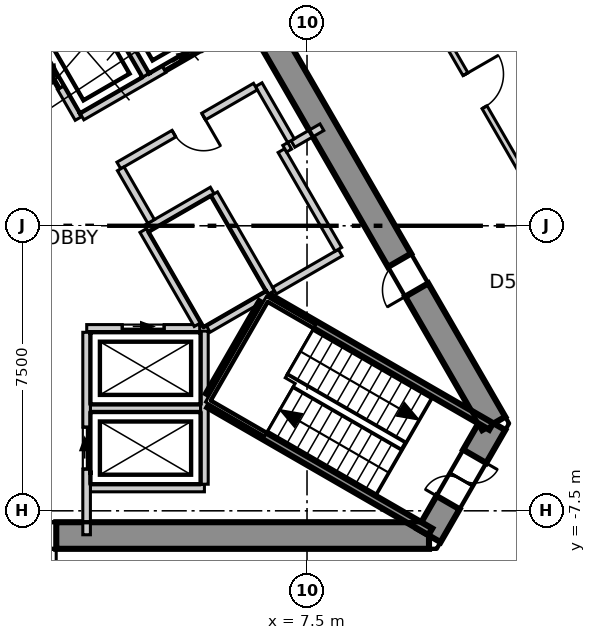
"""IFC4 building model, lengths in metres.
Left out: names, types, materials, properties, quantities, classifications, styles, units other than length and angle.
Written with IfcOpenShell. Run it as: python <this file> out.ifc"""

import sys

from ifc_helpers import new_model, si_unit, direction, frame, frame_2d, origin, place, context, subcontext, project, spatial, polyline, rectangle, outline, extrude, element, fill, save


model = new_model("IFC4")
c1 = context("Model", 3, precision=1e-05, world=origin(), true_north=direction((0.0, 1.0)))
c2 = subcontext(c1, "Body", "Model", "MODEL_VIEW")
j1 = project(units=[si_unit("LENGTHUNIT", "METRE"), si_unit("PLANEANGLEUNIT", "RADIAN")], contexts=[c1])
p1 = place(None, origin())
s1 = spatial("IfcSite", under=j1, at=p1, CompositionType="ELEMENT")
p2 = place(p1, origin())
s2 = spatial("IfcBuilding", under=s1, at=p2, CompositionType="ELEMENT")
p3 = place(p2, frame((0.0, 0.0, 239.3)))
s3 = spatial("IfcBuildingStorey", under=s2, at=p3, CompositionType="ELEMENT", Elevation=239.3)
p4 = place(p3, frame((-10.71, -8.15, -0.3), z_axis=(0.0, 0.0, 1.0), x_axis=(1.0, 0.0, 0.0)))
e1 = element("IfcWall", 1, at=p4, inside=s3, PredefinedType="SHEAR", context=c2, shape_type="SweptSolid", body=[
    extrude(outline(polyline([(-0.202, -0.35), (1.782, -0.35), (3.766, -0.35), (5.75, -0.35), (7.734, -0.35), (9.718, -0.35), (11.702, -0.35), (13.686, -0.35), (15.67, -0.35), (17.654, -0.35), (19.638, -0.35), (21.622, -0.35), (21.218, 0.35), (19.307, 0.35), (17.397, 0.35), (15.486, 0.35), (13.576, 0.35), (11.665, 0.35), (9.755, 0.35), (7.844, 0.35), (5.934, 0.35), (4.023, 0.35), (2.113, 0.35), (0.202, 0.35), (-0.202, -0.35)])), origin(), (0.0, 0.0, 1.0), 4.0),
])
p5 = place(p4, frame((9.81, 0.0, 0.3)))
e2 = element("IfcOpeningElement", 2, at=p5, cuts=e1, PredefinedType="OPENING", context=c2, shape_type="SweptSolid", body=[
    extrude(rectangle(XDim=1.8, YDim=2.1, at=frame_2d((0.9, 1.05))), frame((0.0, 0.36, 0.0), z_axis=(0.0, -1.0, 0.0), x_axis=(1.0, 0.0, 0.0)), (0.0, 0.0, 1.0), 0.72),
])
p6 = place(p3, frame((10.71, -8.15, -0.3), z_axis=(0.0, 0.0, 1.0), x_axis=(0.49999337185, 0.866029230515, 0.0)))
e3 = element("IfcWall", 3, at=p6, inside=s3, PredefinedType="SHEAR", context=c2, shape_type="SweptSolid", body=[
    extrude(outline(polyline([(-0.202, -0.35), (1.703, -0.35), (3.608, -0.35), (3.204, 0.35), (1.703, 0.35), (0.202, 0.35), (-0.202, -0.35)])), origin(), (0.0, 0.0, 1.0), 4.0),
])
p7 = place(p6, frame((1.003, 0.0, 0.3)))
e4 = element("IfcOpeningElement", 4, at=p7, cuts=e3, PredefinedType="OPENING", context=c2, shape_type="SweptSolid", body=[
    extrude(rectangle(XDim=1.4, YDim=2.1, at=frame_2d((0.7, 1.05))), frame((0.0, 0.36, 0.0), z_axis=(0.0, -1.0, 0.0), x_axis=(1.0, 0.0, 0.0)), (0.0, 0.0, 1.0), 0.72),
])
p8 = place(p3, frame((12.413, -5.2, -0.3), z_axis=(0.0, 0.0, 1.0), x_axis=(-0.500011533395, 0.866018744874, 0.0)))
e5 = element("IfcWall", 5, at=p8, inside=s3, PredefinedType="SHEAR", context=c2, shape_type="SweptSolid", body=[
    extrude(outline(polyline([(-0.202, -0.35), (1.782, -0.35), (3.766, -0.35), (5.75, -0.35), (7.734, -0.35), (9.718, -0.35), (11.702, -0.35), (13.686, -0.35), (15.67, -0.35), (17.654, -0.35), (19.638, -0.35), (21.622, -0.35), (21.218, 0.35), (19.307, 0.35), (17.397, 0.35), (15.486, 0.35), (13.576, 0.35), (11.665, 0.35), (9.755, 0.35), (7.844, 0.35), (5.934, 0.35), (4.023, 0.35), (2.113, 0.35), (0.202, 0.35), (-0.202, -0.35)])), origin(), (0.0, 0.0, 1.0), 4.0),
])
p9 = place(p8, frame((4.055, 0.0, 0.3)))
e6 = element("IfcOpeningElement", 6, at=p9, cuts=e5, PredefinedType="OPENING", context=c2, shape_type="SweptSolid", body=[
    extrude(rectangle(XDim=0.9, YDim=2.1, at=frame_2d((0.45, 1.05))), frame((0.0, 0.36, 0.0), z_axis=(0.0, -1.0, 0.0), x_axis=(1.0, 0.0, 0.0)), (0.0, 0.0, 1.0), 0.72),
])
p10 = place(p8, frame((16.415, 0.0, 0.3)))
e7 = element("IfcOpeningElement", 7, at=p10, cuts=e5, PredefinedType="OPENING", context=c2, shape_type="SweptSolid", body=[
    extrude(rectangle(XDim=1.0, YDim=2.1, at=frame_2d((0.5, 1.05))), frame((0.0, 0.36, 0.0), z_axis=(0.0, -1.0, 0.0), x_axis=(1.0, 0.0, 0.0)), (0.0, 0.0, 1.0), 0.72),
])
p11 = place(p3, frame((27.32, -12.671, 0.0), z_axis=(0.0, 0.0, 1.0), x_axis=(-0.499995097538, 0.866028234204, 0.0)))
e8 = element("IfcWall", 8, at=p11, inside=s3, PredefinedType="ELEMENTEDWALL", context=c2, shape_type="SweptSolid", body=[
    extrude(rectangle(XDim=49.247, YDim=0.2, at=frame_2d((24.623, 0.0))), origin(), (0.0, 0.0, 1.0), 3.7),
])
p12 = place(p11, frame((2.119, 0.0, 0.9)))
e9 = element("IfcOpeningElement", 9, at=p12, cuts=e8, PredefinedType="OPENING", context=c2, shape_type="SweptSolid", body=[
    extrude(rectangle(XDim=4.2, YDim=2.5, at=frame_2d((2.1, 1.25))), frame((0.0, 0.11, 0.0), z_axis=(0.0, -1.0, 0.0), x_axis=(1.0, 0.0, 0.0)), (0.0, 0.0, 1.0), 0.22),
])
p13 = place(p11, frame((7.952, 0.0, 0.9)))
e10 = element("IfcOpeningElement", 10, at=p13, cuts=e8, PredefinedType="OPENING", context=c2, shape_type="SweptSolid", body=[
    extrude(rectangle(XDim=4.2, YDim=2.5, at=frame_2d((2.1, 1.25))), frame((0.0, 0.11, 0.0), z_axis=(0.0, -1.0, 0.0), x_axis=(1.0, 0.0, 0.0)), (0.0, 0.0, 1.0), 0.22),
])
p14 = place(p11, frame((13.784, 0.0, 0.9)))
e11 = element("IfcOpeningElement", 11, at=p14, cuts=e8, PredefinedType="OPENING", context=c2, shape_type="SweptSolid", body=[
    extrude(rectangle(XDim=4.2, YDim=2.5, at=frame_2d((2.1, 1.25))), frame((0.0, 0.11, 0.0), z_axis=(0.0, -1.0, 0.0), x_axis=(1.0, 0.0, 0.0)), (0.0, 0.0, 1.0), 0.22),
])
p15 = place(p11, frame((19.617, 0.0, 0.9)))
e12 = element("IfcOpeningElement", 12, at=p15, cuts=e8, PredefinedType="OPENING", context=c2, shape_type="SweptSolid", body=[
    extrude(rectangle(XDim=4.2, YDim=2.5, at=frame_2d((2.1, 1.25))), frame((0.0, 0.11, 0.0), z_axis=(0.0, -1.0, 0.0), x_axis=(1.0, 0.0, 0.0)), (0.0, 0.0, 1.0), 0.22),
])
p16 = place(p11, frame((25.45, 0.0, 0.9)))
e13 = element("IfcOpeningElement", 13, at=p16, cuts=e8, PredefinedType="OPENING", context=c2, shape_type="SweptSolid", body=[
    extrude(rectangle(XDim=4.2, YDim=2.5, at=frame_2d((2.1, 1.25))), frame((0.0, 0.11, 0.0), z_axis=(0.0, -1.0, 0.0), x_axis=(1.0, 0.0, 0.0)), (0.0, 0.0, 1.0), 0.22),
])
p17 = place(p11, frame((31.282, 0.0, 0.9)))
e14 = element("IfcOpeningElement", 14, at=p17, cuts=e8, PredefinedType="OPENING", context=c2, shape_type="SweptSolid", body=[
    extrude(rectangle(XDim=4.2, YDim=2.5, at=frame_2d((2.1, 1.25))), frame((0.0, 0.11, 0.0), z_axis=(0.0, -1.0, 0.0), x_axis=(1.0, 0.0, 0.0)), (0.0, 0.0, 1.0), 0.22),
])
p18 = place(p11, frame((37.115, 0.0, 0.9)))
e15 = element("IfcOpeningElement", 15, at=p18, cuts=e8, PredefinedType="OPENING", context=c2, shape_type="SweptSolid", body=[
    extrude(rectangle(XDim=4.2, YDim=2.5, at=frame_2d((2.1, 1.25))), frame((0.0, 0.11, 0.0), z_axis=(0.0, -1.0, 0.0), x_axis=(1.0, 0.0, 0.0)), (0.0, 0.0, 1.0), 0.22),
])
p19 = place(p11, frame((42.947, 0.0, 0.9)))
e16 = element("IfcOpeningElement", 16, at=p19, cuts=e8, PredefinedType="OPENING", context=c2, shape_type="SweptSolid", body=[
    extrude(rectangle(XDim=4.2, YDim=2.5, at=frame_2d((2.1, 1.25))), frame((0.0, 0.11, 0.0), z_axis=(0.0, -1.0, 0.0), x_axis=(1.0, 0.0, 0.0)), (0.0, 0.0, 1.0), 0.22),
])
p20 = place(p3, frame((0.075, 24.07, 0.0), z_axis=(0.0, 0.0, 1.0), x_axis=(0.500006834213, -0.866021458014, 0.0)))
e17 = element("IfcWall", 17, at=p20, inside=s3, PredefinedType="PARTITIONING", context=c2, shape_type="SweptSolid", body=[
    extrude(rectangle(XDim=41.616, YDim=0.15, at=frame_2d((20.808, 0.0))), origin(), (0.0, 0.0, 1.0), 3.7),
])
p21 = place(p20, frame((36.616, 0.0, 0.0)))
e18 = element("IfcOpeningElement", 18, at=p21, cuts=e17, PredefinedType="OPENING", context=c2, shape_type="SweptSolid", body=[
    extrude(rectangle(XDim=1.1, YDim=2.1, at=frame_2d((0.55, 1.05))), frame((0.0, 0.085, 0.0), z_axis=(0.0, -1.0, 0.0), x_axis=(1.0, 0.0, 0.0)), (0.0, 0.0, 1.0), 0.17),
])
p22 = place(p20, frame((29.024, 0.0, 0.0)))
e19 = element("IfcOpeningElement", 19, at=p22, cuts=e17, PredefinedType="OPENING", context=c2, shape_type="SweptSolid", body=[
    extrude(rectangle(XDim=1.0, YDim=2.1, at=frame_2d((0.5, 1.05))), frame((0.0, 0.085, 0.0), z_axis=(0.0, -1.0, 0.0), x_axis=(1.0, 0.0, 0.0)), (0.0, 0.0, 1.0), 0.17),
])
p23 = place(p20, frame((23.19, 0.0, 0.0)))
e20 = element("IfcOpeningElement", 20, at=p23, cuts=e17, PredefinedType="OPENING", context=c2, shape_type="SweptSolid", body=[
    extrude(rectangle(XDim=1.0, YDim=2.1, at=frame_2d((0.5, 1.05))), frame((0.0, 0.085, 0.0), z_axis=(0.0, -1.0, 0.0), x_axis=(1.0, 0.0, 0.0)), (0.0, 0.0, 1.0), 0.17),
])
p24 = place(p20, frame((14.458, 0.0, 0.0)))
e21 = element("IfcOpeningElement", 21, at=p24, cuts=e17, PredefinedType="OPENING", context=c2, shape_type="SweptSolid", body=[
    extrude(rectangle(XDim=1.1, YDim=2.1, at=frame_2d((0.55, 1.05))), frame((0.0, 0.085, 0.0), z_axis=(0.0, -1.0, 0.0), x_axis=(1.0, 0.0, 0.0)), (0.0, 0.0, 1.0), 0.17),
])
p25 = place(p20, frame((3.993, 0.0, 0.0)))
e22 = element("IfcOpeningElement", 22, at=p25, cuts=e17, PredefinedType="OPENING", context=c2, shape_type="SweptSolid", body=[
    extrude(rectangle(XDim=1.1, YDim=2.1, at=frame_2d((0.55, 1.05))), frame((0.0, 0.085, 0.0), z_axis=(0.0, -1.0, 0.0), x_axis=(1.0, 0.0, 0.0)), (0.0, 0.0, 1.0), 0.17),
])
p26 = place(p3, frame((1.8, -4.8, 0.0), z_axis=(0.0, 0.0, 1.0), x_axis=(1.0, 0.0, 0.0)))
e23 = element("IfcWall", 23, at=p26, inside=s3, PredefinedType="SOLIDWALL", context=c2, shape_type="SweptSolid", body=[
    extrude(rectangle(XDim=2.9, YDim=0.2, at=frame_2d((1.45, 0.0))), origin(), (0.0, 0.0, 1.0), 3.7),
])
p27 = place(p3, frame((1.8, -6.9, 0.0), z_axis=(0.0, 0.0, 1.0), x_axis=(1.0, 0.0, 0.0)))
e24 = element("IfcWall", 24, at=p27, inside=s3, PredefinedType="SOLIDWALL", context=c2, shape_type="SweptSolid", body=[
    extrude(rectangle(XDim=3.0, YDim=0.2, at=frame_2d((1.5, 0.0))), origin(), (0.0, 0.0, 1.0), 3.7),
])
p28 = place(p3, frame((1.703, -2.7, 0.0), z_axis=(0.0, 0.0, 1.0), x_axis=(1.0, 0.0, 0.0)))
e25 = element("IfcWall", 25, at=p28, inside=s3, PredefinedType="SOLIDWALL", context=c2, shape_type="SweptSolid", body=[
    extrude(rectangle(XDim=2.973, YDim=0.2, at=frame_2d((1.487, 0.0))), origin(), (0.0, 0.0, 1.0), 3.7),
])
p29 = place(p28, frame((0.936, 0.0, 0.0)))
e26 = element("IfcOpeningElement", 26, at=p29, cuts=e25, PredefinedType="OPENING", context=c2, shape_type="SweptSolid", body=[
    extrude(rectangle(XDim=1.1, YDim=2.1, at=frame_2d((0.55, 1.05))), frame((0.0, 0.11, 0.0), z_axis=(0.0, -1.0, 0.0), x_axis=(1.0, 0.0, 0.0)), (0.0, 0.0, 1.0), 0.22),
])
p30 = place(p3, frame((0.0, 5.4, 0.0), z_axis=(0.0, 0.0, 1.0), x_axis=(0.500103862429, -0.865965430478, 0.0)))
e27 = element("IfcWall", 27, at=p30, inside=s3, PredefinedType="SOLIDWALL", context=c2, shape_type="SweptSolid", body=[
    extrude(rectangle(XDim=2.973, YDim=0.2, at=frame_2d((1.487, 0.0))), origin(), (0.0, 0.0, 1.0), 3.7),
])
p31 = place(p30, frame((0.937, 0.0, 0.0)))
e28 = element("IfcOpeningElement", 28, at=p31, cuts=e27, PredefinedType="OPENING", context=c2, shape_type="SweptSolid", body=[
    extrude(rectangle(XDim=1.1, YDim=2.1, at=frame_2d((0.55, 1.05))), frame((0.0, 0.11, 0.0), z_axis=(0.0, -1.0, 0.0), x_axis=(1.0, 0.0, 0.0)), (0.0, 0.0, 1.0), 0.22),
])
p32 = place(p3, frame((3.19, -0.125, 0.0), z_axis=(0.0, 0.0, 1.0), x_axis=(0.499988658015, -0.866031951983, 0.0)))
e29 = element("IfcWall", 29, at=p32, inside=s3, PredefinedType="SOLIDWALL", context=c2, shape_type="SweptSolid", body=[
    extrude(rectangle(XDim=2.858, YDim=0.2, at=frame_2d((1.429, 0.0))), origin(), (0.0, 0.0, 1.0), 3.7),
])
p33 = place(p3, frame((1.578, 2.874, 0.0), z_axis=(0.0, 0.0, 1.0), x_axis=(0.866045911672, 0.499964477614, 0.0)))
e30 = element("IfcWall", 30, at=p33, inside=s3, PredefinedType="SOLIDWALL", context=c2, shape_type="SweptSolid", body=[
    extrude(rectangle(XDim=5.327, YDim=0.2, at=frame_2d((2.663, 0.0))), origin(), (0.0, 0.0, 1.0), 3.7),
])
p34 = place(p33, frame((2.496, 0.0, 0.0)))
e31 = element("IfcOpeningElement", 31, at=p34, cuts=e30, PredefinedType="OPENING", context=c2, shape_type="SweptSolid", body=[
    extrude(rectangle(XDim=1.1, YDim=2.1, at=frame_2d((0.55, 1.05))), frame((0.0, 0.11, 0.0), z_axis=(0.0, -1.0, 0.0), x_axis=(1.0, 0.0, 0.0)), (0.0, 0.0, 1.0), 0.22),
])
p35 = place(p3, frame((1.7, -8.13, 0.0), z_axis=(0.0, 0.0, 1.0), x_axis=(0.0, 1.0, 0.0)))
e32 = element("IfcWall", 32, at=p35, inside=s3, PredefinedType="SOLIDWALL", context=c2, shape_type="SweptSolid", body=[
    extrude(rectangle(XDim=5.327, YDim=0.2, at=frame_2d((2.664, 0.0))), origin(), (0.0, 0.0, 1.0), 3.7),
])
p36 = place(p35, frame((1.73, 0.0, 0.0)))
e33 = element("IfcOpeningElement", 33, at=p36, cuts=e32, PredefinedType="OPENING", context=c2, shape_type="SweptSolid", body=[
    extrude(rectangle(XDim=1.1, YDim=2.1, at=frame_2d((0.55, 1.05))), frame((0.0, 0.11, 0.0), z_axis=(0.0, -1.0, 0.0), x_axis=(1.0, 0.0, 0.0)), (0.0, 0.0, 1.0), 0.22),
])
p37 = place(p3, frame((4.8, -6.8, 0.0), z_axis=(0.0, 0.0, 1.0), x_axis=(0.0, 1.0, 0.0)))
e34 = element("IfcWall", 34, at=p37, inside=s3, PredefinedType="SOLIDWALL", context=c2, shape_type="SweptSolid", body=[
    extrude(rectangle(XDim=4.029, YDim=0.2, at=frame_2d((2.015, 0.0))), origin(), (0.0, 0.0, 1.0), 3.7),
])
p38 = place(p3, frame((3.278, -0.071, 0.0), z_axis=(0.0, 0.0, 1.0), x_axis=(0.865855657918, 0.500293893279, 0.0)))
e35 = element("IfcWall", 35, at=p38, inside=s3, PredefinedType="SOLIDWALL", context=c2, shape_type="SweptSolid", body=[
    extrude(rectangle(XDim=1.997, YDim=0.2, at=frame_2d((0.999, 0.0))), origin(), (0.0, 0.0, 1.0), 3.7),
])
p39 = place(p3, frame((7.129, 2.153, 0.0), z_axis=(0.0, 0.0, 1.0), x_axis=(0.866083962871, 0.499898558967, 0.0)))
e36 = element("IfcWall", 36, at=p39, inside=s3, PredefinedType="SOLIDWALL", context=c2, shape_type="SweptSolid", body=[
    extrude(rectangle(XDim=0.88, YDim=0.2, at=frame_2d((0.44, 0.0))), origin(), (0.0, 0.0, 1.0), 3.7),
])
p40 = place(p3, frame((1.807, 6.47, 0.0), z_axis=(0.0, 0.0, 1.0), x_axis=(0.50012328804, -0.865954211699, 0.0)))
e37 = element("IfcWall", 37, at=p40, inside=s3, PredefinedType="SOLIDWALL", context=c2, shape_type="SweptSolid", body=[
    extrude(rectangle(XDim=2.9, YDim=0.2, at=frame_2d((1.45, 0.0))), origin(), (0.0, 0.0, 1.0), 3.7),
])
p41 = place(p3, frame((5.057, 0.841, 0.0), z_axis=(0.0, 0.0, 1.0), x_axis=(0.499990139034, -0.866031096941, 0.0)))
e38 = element("IfcWall", 38, at=p41, inside=s3, PredefinedType="SOLIDWALL", context=c2, shape_type="SweptSolid", body=[
    extrude(rectangle(XDim=3.0, YDim=0.2, at=frame_2d((1.5, 0.0))), origin(), (0.0, 0.0, 1.0), 3.7),
])
p42 = place(p3, frame((4.9, -2.714, 0.0), z_axis=(0.0, 0.0, 1.0), x_axis=(0.865846928409, 0.500309001083, 0.0)))
e39 = element("IfcWall", 39, at=p42, inside=s3, PredefinedType="SOLIDWALL", context=c2, shape_type="SweptSolid", body=[
    extrude(rectangle(XDim=1.813, YDim=0.2, at=frame_2d((0.907, 0.0))), origin(), (0.0, 0.0, 1.0), 3.7),
])
p43 = place(p3, frame((6.229, 3.712, 0.0), z_axis=(0.0, 0.0, 1.0), x_axis=(0.499875724984, -0.86609714211, 0.0)))
e40 = element("IfcWall", 40, at=p43, inside=s3, PredefinedType="SOLIDWALL", context=c2, shape_type="SweptSolid", body=[
    extrude(rectangle(XDim=1.701, YDim=0.2, at=frame_2d((0.85, 0.0))), origin(), (0.0, 0.0, 1.0), 3.7),
])
p44 = place(p3, frame((2.548, 1.587, 0.0), z_axis=(0.0, 0.0, 1.0), x_axis=(0.866004344652, 0.500036473714, 0.0)))
e41 = element("IfcWall", 41, at=p44, inside=s3, PredefinedType="SOLIDWALL", context=c2, shape_type="SweptSolid", body=[
    extrude(rectangle(XDim=4.15, YDim=0.2, at=frame_2d((2.075, 0.0))), origin(), (0.0, 0.0, 1.0), 3.7),
])
p45 = place(p44, frame((1.675, 0.0, 0.0)))
e42 = element("IfcOpeningElement", 42, at=p45, cuts=e41, PredefinedType="OPENING", context=c2, shape_type="SweptSolid", body=[
    extrude(rectangle(XDim=0.9, YDim=2.1, at=frame_2d((0.45, 1.05))), frame((0.0, 0.11, 0.0), z_axis=(0.0, -1.0, 0.0), x_axis=(1.0, 0.0, 0.0)), (0.0, 0.0, 1.0), 0.22),
])
p46 = place(p3, frame((2.598, 1.5, 0.0), z_axis=(0.0, 0.0, 1.0), x_axis=(0.499929347863, -0.866066190972, 0.0)))
e43 = element("IfcWall", 43, at=p46, inside=s3, PredefinedType="SOLIDWALL", context=c2, shape_type="SweptSolid", body=[
    extrude(rectangle(XDim=1.6, YDim=0.2, at=frame_2d((0.8, 0.0))), origin(), (0.0, 0.0, 1.0), 3.7),
])
p47 = place(p3, frame((6.642, -1.708, 0.0), z_axis=(0.0, 0.0, 1.0), x_axis=(0.866043441391, 0.499968756647, 0.0)))
e44 = element("IfcWall", 44, at=p47, inside=s3, PredefinedType="SOLIDWALL", context=c2, shape_type="SweptSolid", body=[
    extrude(rectangle(XDim=2.002, YDim=0.2, at=frame_2d((1.001, 0.0))), origin(), (0.0, 0.0, 1.0), 3.7),
])
p48 = place(p3, frame((6.826, 1.978, 0.0), z_axis=(0.0, 0.0, 1.0), x_axis=(0.499990139034, -0.866031096941, 0.0)))
e45 = element("IfcWall", 45, at=p48, inside=s3, PredefinedType="SOLIDWALL", context=c2, shape_type="SweptSolid", body=[
    extrude(rectangle(XDim=3.0, YDim=0.2, at=frame_2d((1.5, 0.0))), origin(), (0.0, 0.0, 1.0), 3.7),
])
p49 = place(p3, frame((6.912, 2.028, 0.0), z_axis=(0.0, 0.0, 1.0), x_axis=(0.866559367082, 0.499074005857, 0.0)))
e46 = element("IfcWall", 46, at=p49, inside=s3, PredefinedType="SOLIDWALL", context=c2, shape_type="SweptSolid", body=[
    extrude(rectangle(XDim=0.152, YDim=0.2, at=frame_2d((0.076, 0.0))), origin(), (0.0, 0.0, 1.0), 3.7),
])
p50 = place(p3, frame((4.929, -4.693, 0.0), z_axis=(0.0, 0.0, 1.0), x_axis=(0.865983344943, -0.500072840975, 0.0)))
e47 = element("IfcWall", 47, at=p50, inside=s3, PredefinedType="SOLIDWALL", context=c2, shape_type="SweptSolid", body=[
    extrude(rectangle(XDim=6.715, YDim=0.2, at=frame_2d((3.357, 0.0))), origin(), (0.0, 0.0, 1.0), 3.7),
])
p51 = place(p3, frame((4.929, -4.462, 0.0), z_axis=(0.0, 0.0, 1.0), x_axis=(0.500200581029, 0.865909567298, 0.0)))
e48 = element("IfcWall", 48, at=p51, inside=s3, PredefinedType="SOLIDWALL", context=c2, shape_type="SweptSolid", body=[
    extrude(rectangle(XDim=2.799, YDim=0.2, at=frame_2d((1.399, 0.0))), origin(), (0.0, 0.0, 1.0), 3.7),
])
p52 = place(p3, frame((6.529, -1.922, 0.0), z_axis=(0.0, 0.0, 1.0), x_axis=(0.866046323291, -0.499963764601, 0.0)))
e49 = element("IfcWall", 49, at=p52, inside=s3, PredefinedType="SOLIDWALL", context=c2, shape_type="SweptSolid", body=[
    extrude(rectangle(XDim=6.714, YDim=0.2, at=frame_2d((3.357, 0.0))), origin(), (0.0, 0.0, 1.0), 3.7),
])
p53 = place(p29, origin())
e50 = element("IfcDoor", 50, at=p53, inside=s3, OperationType="SLIDING_TO_LEFT", PredefinedType="DOOR", context=c2, shape_type="SweptSolid", body=[
    extrude(rectangle(XDim=1.1, YDim=2.1, at=frame_2d((0.55, 1.05))), frame((0.0, 0.025, 0.0), z_axis=(0.0, -1.0, 0.0), x_axis=(1.0, 0.0, 0.0)), (0.0, 0.0, 1.0), 0.05),
])
fill(e26, e50)
p54 = place(p36, origin())
e51 = element("IfcDoor", 51, at=p54, inside=s3, OperationType="SLIDING_TO_LEFT", PredefinedType="DOOR", context=c2, shape_type="SweptSolid", body=[
    extrude(rectangle(XDim=1.1, YDim=2.1, at=frame_2d((0.55, 1.05))), frame((0.0, 0.025, 0.0), z_axis=(0.0, -1.0, 0.0), x_axis=(1.0, 0.0, 0.0)), (0.0, 0.0, 1.0), 0.05),
])
fill(e33, e51)
p55 = place(p31, origin())
e52 = element("IfcDoor", 52, at=p55, inside=s3, OperationType="SLIDING_TO_LEFT", PredefinedType="DOOR", context=c2, shape_type="SweptSolid", body=[
    extrude(rectangle(XDim=1.1, YDim=2.1, at=frame_2d((0.55, 1.05))), frame((0.0, 0.025, 0.0), z_axis=(0.0, -1.0, 0.0), x_axis=(1.0, 0.0, 0.0)), (0.0, 0.0, 1.0), 0.05),
])
fill(e28, e52)
p56 = place(p34, origin())
e53 = element("IfcDoor", 53, at=p56, inside=s3, OperationType="SLIDING_TO_LEFT", PredefinedType="DOOR", context=c2, shape_type="SweptSolid", body=[
    extrude(rectangle(XDim=1.1, YDim=2.1, at=frame_2d((0.55, 1.05))), frame((0.0, 0.025, 0.0), z_axis=(0.0, -1.0, 0.0), x_axis=(1.0, 0.0, 0.0)), (0.0, 0.0, 1.0), 0.05),
])
fill(e31, e53)
p57 = place(p23, origin())
e54 = element("IfcDoor", 54, at=p57, inside=s3, OperationType="SINGLE_SWING_RIGHT", PredefinedType="DOOR", context=c2, shape_type="SweptSolid", body=[
    extrude(rectangle(XDim=1.0, YDim=2.1, at=frame_2d((0.5, 1.05))), frame((0.0, 0.025, 0.0), z_axis=(0.0, -1.0, 0.0), x_axis=(1.0, 0.0, 0.0)), (0.0, 0.0, 1.0), 0.05),
])
fill(e20, e54)
p58 = place(p5, origin())
e55 = element("IfcDoor", 55, at=p58, inside=s3, OperationType="DOUBLE_DOOR_SINGLE_SWING", PredefinedType="DOOR", context=c2, shape_type="SweptSolid", body=[
    extrude(rectangle(XDim=1.8, YDim=2.1, at=frame_2d((0.9, 1.05))), frame((0.0, 0.025, 0.0), z_axis=(0.0, -1.0, 0.0), x_axis=(1.0, 0.0, 0.0)), (0.0, 0.0, 1.0), 0.05),
])
fill(e2, e55)
p59 = place(p7, origin())
e56 = element("IfcDoor", 56, at=p59, inside=s3, OperationType="DOUBLE_DOOR_SINGLE_SWING", PredefinedType="DOOR", context=c2, shape_type="SweptSolid", body=[
    extrude(rectangle(XDim=1.4, YDim=2.1, at=frame_2d((0.7, 1.05))), frame((0.0, 0.025, 0.0), z_axis=(0.0, -1.0, 0.0), x_axis=(1.0, 0.0, 0.0)), (0.0, 0.0, 1.0), 0.05),
])
fill(e4, e56)
p60 = place(p9, origin())
e57 = element("IfcDoor", 57, at=p60, inside=s3, OperationType="SINGLE_SWING_RIGHT", PredefinedType="DOOR", context=c2, shape_type="SweptSolid", body=[
    extrude(rectangle(XDim=0.9, YDim=2.1, at=frame_2d((0.45, 1.05))), frame((0.0, 0.025, 0.0), z_axis=(0.0, -1.0, 0.0), x_axis=(1.0, 0.0, 0.0)), (0.0, 0.0, 1.0), 0.05),
])
fill(e6, e57)
p61 = place(p45, origin())
e58 = element("IfcDoor", 58, at=p61, inside=s3, OperationType="SINGLE_SWING_RIGHT", PredefinedType="DOOR", context=c2, shape_type="SweptSolid", body=[
    extrude(rectangle(XDim=0.9, YDim=2.1, at=frame_2d((0.45, 1.05))), frame((0.0, 0.025, 0.0), z_axis=(0.0, -1.0, 0.0), x_axis=(1.0, 0.0, 0.0)), (0.0, 0.0, 1.0), 0.05),
])
fill(e42, e58)
save(model, sys.argv[1])
